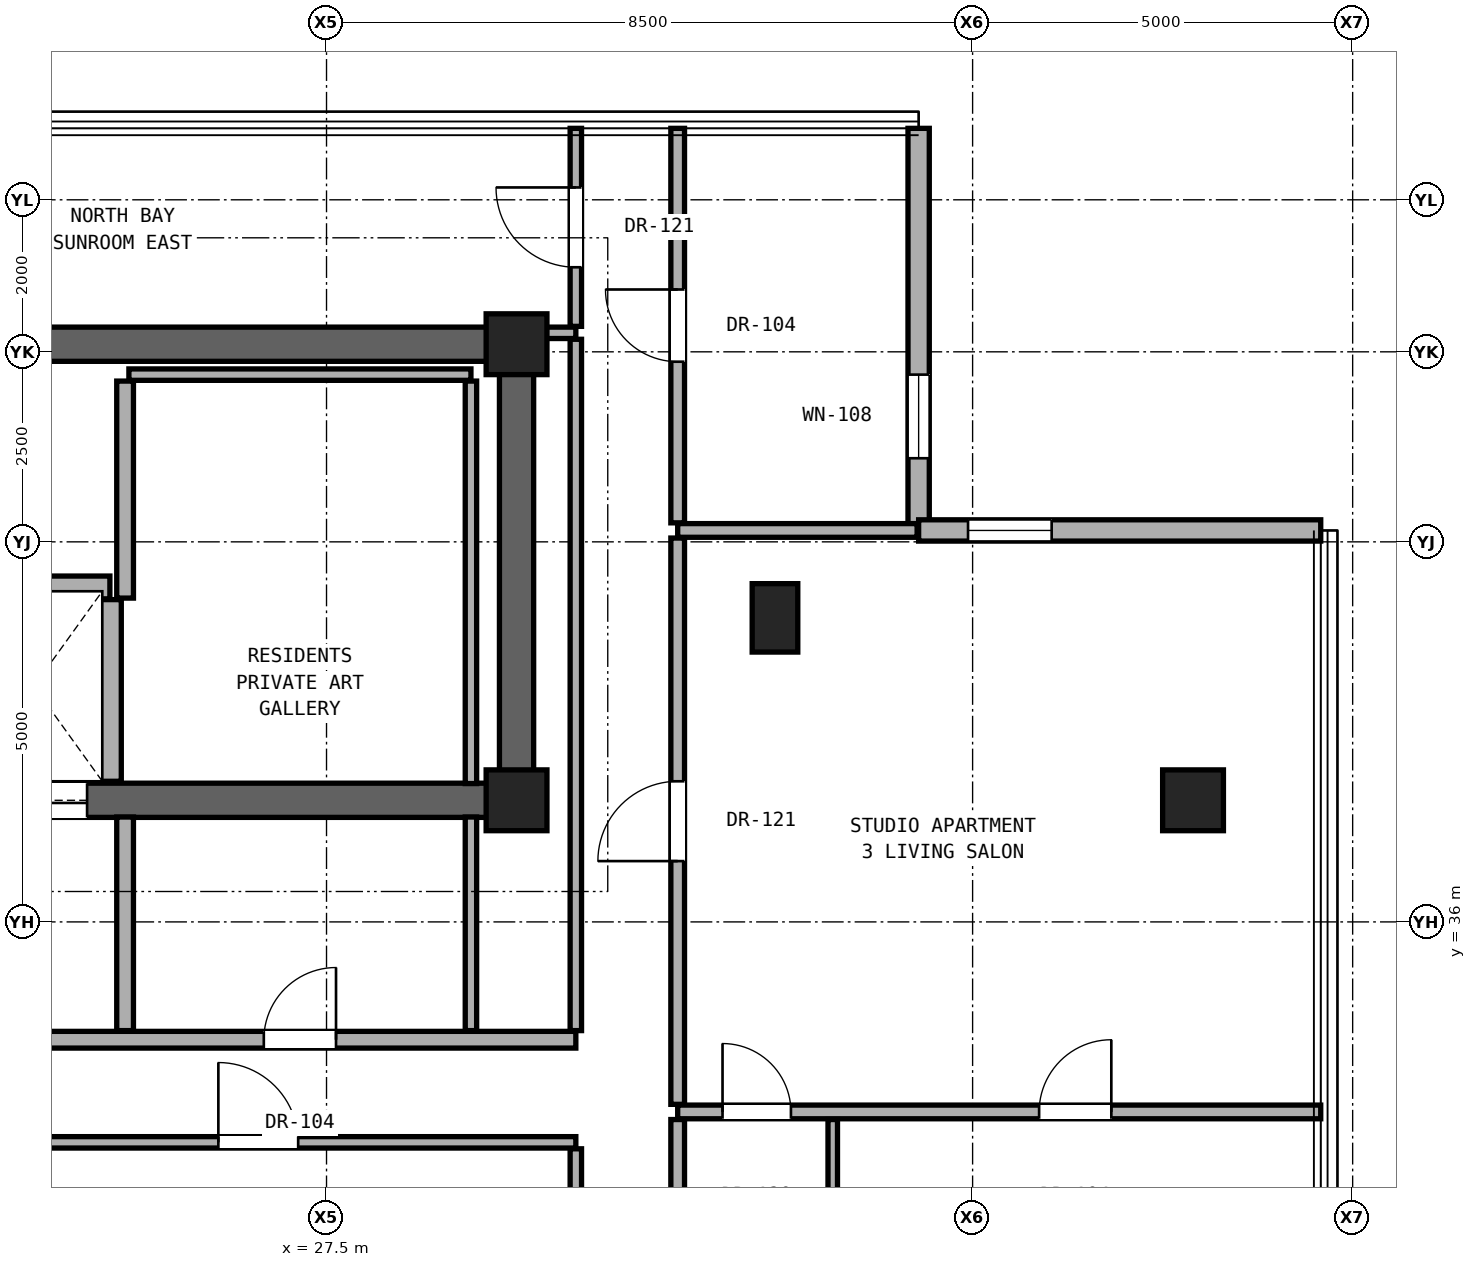
"""IFC4 building model, lengths in metres.
Left out: names, types, materials, properties, quantities, classifications, styles, units other than length and angle.
Written with IfcOpenShell. Run it as: python <this file> out.ifc"""

import sys

from ifc_helpers import new_model, si_unit, direction, frame, frame_2d, origin, origin_2d, place, context, subcontext, project, spatial, rectangle, hollow_rectangle, extrude, element, fill, save


model = new_model("IFC4")
c1 = context("Model", 3, precision=1e-05, world=origin(), true_north=direction((0.0, 1.0)))
c2 = subcontext(c1, "Body", "Model", "MODEL_VIEW")
j1 = project(units=[si_unit("LENGTHUNIT", "METRE"), si_unit("PLANEANGLEUNIT", "RADIAN")], contexts=[c1])
p1 = place(None, origin())
s1 = spatial("IfcSite", under=j1, at=p1, CompositionType="ELEMENT")
p2 = place(p1, origin())
s2 = spatial("IfcBuilding", under=s1, at=p2, CompositionType="ELEMENT")
p3 = place(p2, frame((0.0, 0.0, 219.4)))
s3 = spatial("IfcBuildingStorey", under=s2, at=p3, CompositionType="ELEMENT", Elevation=219.4)
for number, where, z_axis, x_axis in (
    (1, (30.0, 37.6, 0.0), (0.0, 0.0, 1.0), (1.0, 0.0, 0.0)),
    (2, (30.0, 43.6, 0.0), (0.0, 0.0, 1.0), (1.0, 0.0, 0.0)),
):
    element("IfcColumn", number, at=place(p3, frame(where, z_axis=z_axis, x_axis=x_axis)), inside=s3, PredefinedType="COLUMN", context=c2, shape_type="SweptSolid", body=[
        extrude(rectangle(XDim=0.8, YDim=0.8, at=origin_2d()), origin(), (0.0, 0.0, 1.0), 3.3),
    ])
p4 = place(p3, frame((38.9, 37.6, 0.0), z_axis=(0.0, 0.0, 1.0), x_axis=(1.0, 0.0, 0.0)))
e3 = element("IfcColumn", 3, at=p4, inside=s3, PredefinedType="COLUMN", context=c2, shape_type="SweptSolid", body=[
    extrude(hollow_rectangle(XDim=0.8, YDim=0.8, WallThickness=0.045, at=origin_2d()), origin(), (0.0, 0.0, 1.0), 3.3),
])
p5 = place(p3, frame((33.4, 40.0, 0.0), z_axis=(0.0, 0.0, 1.0), x_axis=(1.0, 0.0, 0.0)))
e4 = element("IfcColumn", 4, at=p5, inside=s3, PredefinedType="PILASTER", context=c2, shape_type="SweptSolid", body=[
    extrude(rectangle(XDim=0.6, YDim=0.9, at=origin_2d()), origin(), (0.0, 0.0, 1.0), 3.3),
])
p6 = place(p3, frame((11.0, 43.6, 0.0), z_axis=(0.0, 0.0, 1.0), x_axis=(1.0, 0.0, 0.0)))
e5 = element("IfcWall", 5, at=p6, inside=s3, PredefinedType="SHEAR", context=c2, shape_type="SweptSolid", body=[
    extrude(rectangle(XDim=19.0, YDim=0.45, at=frame_2d((9.5, 0.0))), origin(), (0.0, 0.0, 1.0), 3.1),
])
p7 = place(p3, frame((30.0, 37.6, 0.0), z_axis=(0.0, 0.0, 1.0), x_axis=(0.0, 1.0, 0.0)))
e6 = element("IfcWall", 6, at=p7, inside=s3, PredefinedType="SHEAR", context=c2, shape_type="SweptSolid", body=[
    extrude(rectangle(XDim=6.0, YDim=0.45, at=frame_2d((3.0, 0.0))), origin(), (0.0, 0.0, 1.0), 3.1),
])
p8 = place(p3, frame((11.0, 37.6, 0.0), z_axis=(0.0, 0.0, 1.0), x_axis=(1.0, 0.0, 0.0)))
e7 = element("IfcWall", 7, at=p8, inside=s3, PredefinedType="SHEAR", context=c2, shape_type="SweptSolid", body=[
    extrude(rectangle(XDim=19.0, YDim=0.45, at=frame_2d((9.5, 0.0))), origin(), (0.0, 0.0, 1.0), 3.1),
])
p9 = place(p8, frame((1.06, 0.0, 0.0)))
e8 = element("IfcOpeningElement", 8, at=p9, cuts=e7, PredefinedType="OPENING", context=c2, shape_type="SweptSolid", body=[
    extrude(rectangle(XDim=1.15, YDim=2.2, at=frame_2d((0.575, 1.1))), frame((0.0, 0.235, 0.0), z_axis=(0.0, -1.0, 0.0), x_axis=(1.0, 0.0, 0.0)), (0.0, 0.0, 1.0), 0.47),
])
p10 = place(p8, frame((9.55, 0.0, 0.0)))
e9 = element("IfcOpeningElement", 9, at=p10, cuts=e7, PredefinedType="OPENING", context=c2, shape_type="SweptSolid", body=[
    extrude(rectangle(XDim=1.4, YDim=2.35, at=frame_2d((0.7, 1.175))), frame((0.0, 0.235, 0.0), z_axis=(0.0, -1.0, 0.0), x_axis=(1.0, 0.0, 0.0)), (0.0, 0.0, 1.0), 0.47),
])
p11 = place(p8, frame((11.95, 0.0, 0.0)))
e10 = element("IfcOpeningElement", 10, at=p11, cuts=e7, PredefinedType="OPENING", context=c2, shape_type="SweptSolid", body=[
    extrude(rectangle(XDim=1.4, YDim=2.35, at=frame_2d((0.7, 1.175))), frame((0.0, 0.235, 0.0), z_axis=(0.0, -1.0, 0.0), x_axis=(1.0, 0.0, 0.0)), (0.0, 0.0, 1.0), 0.47),
])
p12 = place(p3, frame((35.29, 41.15, 0.0), z_axis=(0.0, 0.0, 1.0), x_axis=(0.0, 1.0, 0.0)))
e11 = element("IfcWall", 11, at=p12, inside=s3, PredefinedType="SOLIDWALL", context=c2, shape_type="SweptSolid", body=[
    extrude(rectangle(XDim=5.29, YDim=0.28, at=frame_2d((2.645, 0.0))), origin(), (0.0, 0.0, 1.0), 3.08),
])
p13 = place(p12, frame((0.95, 0.0, 0.85)))
e12 = element("IfcOpeningElement", 12, at=p13, cuts=e11, PredefinedType="OPENING", context=c2, shape_type="SweptSolid", body=[
    extrude(rectangle(XDim=1.1, YDim=2.0, at=frame_2d((0.55, 1.0))), frame((0.0, 0.15, 0.0), z_axis=(0.0, -1.0, 0.0), x_axis=(1.0, 0.0, 0.0)), (0.0, 0.0, 1.0), 0.3),
])
p14 = place(p3, frame((40.58, 41.15, 0.0), z_axis=(0.0, 0.0, 1.0), x_axis=(-1.0, 0.0, 0.0)))
e13 = element("IfcWall", 13, at=p14, inside=s3, PredefinedType="SOLIDWALL", context=c2, shape_type="SweptSolid", body=[
    extrude(rectangle(XDim=5.29, YDim=0.28, at=frame_2d((2.645, 0.0))), origin(), (0.0, 0.0, 1.0), 3.08),
])
p15 = place(p14, frame((3.54, 0.0, 0.85)))
e14 = element("IfcOpeningElement", 14, at=p15, cuts=e13, PredefinedType="OPENING", context=c2, shape_type="SweptSolid", body=[
    extrude(rectangle(XDim=1.1, YDim=2.0, at=frame_2d((0.55, 1.0))), frame((0.0, 0.15, 0.0), z_axis=(0.0, -1.0, 0.0), x_axis=(1.0, 0.0, 0.0)), (0.0, 0.0, 1.0), 0.3),
])
p16 = place(p3, frame((10.22, 33.1, 0.0), z_axis=(0.0, 0.0, 1.0), x_axis=(1.0, 0.0, 0.0)))
e15 = element("IfcWall", 15, at=p16, inside=s3, PredefinedType="PARTITIONING", context=c2, shape_type="SweptSolid", body=[
    extrude(rectangle(XDim=20.56, YDim=0.15, at=frame_2d((10.28, 0.0))), origin(), (0.0, 0.0, 1.0), 2.236),
])
p17 = place(p16, frame((15.857, 0.0, 0.0)))
e16 = element("IfcOpeningElement", 16, at=p17, cuts=e15, PredefinedType="OPENING", context=c2, shape_type="SweptSolid", body=[
    extrude(rectangle(XDim=1.05, YDim=2.2, at=frame_2d((0.525, 1.1))), frame((0.0, 0.085, 0.0), z_axis=(0.0, -1.0, 0.0), x_axis=(1.0, 0.0, 0.0)), (0.0, 0.0, 1.0), 0.17),
])
p18 = place(p3, frame((32.12, 33.5, 0.0), z_axis=(0.0, 0.0, 1.0), x_axis=(1.0, 0.0, 0.0)))
e17 = element("IfcWall", 17, at=p18, inside=s3, PredefinedType="PARTITIONING", context=c2, shape_type="SweptSolid", body=[
    extrude(rectangle(XDim=8.46, YDim=0.18, at=frame_2d((4.23, 0.0))), origin(), (0.0, 0.0, 1.0), 2.319),
])
p19 = place(p18, frame((4.755, 0.0, 0.0)))
e18 = element("IfcOpeningElement", 18, at=p19, cuts=e17, PredefinedType="OPENING", context=c2, shape_type="SweptSolid", body=[
    extrude(rectangle(XDim=0.95, YDim=2.15, at=frame_2d((0.475, 1.075))), frame((0.0, 0.1, 0.0), z_axis=(0.0, -1.0, 0.0), x_axis=(1.0, 0.0, 0.0)), (0.0, 0.0, 1.0), 0.2),
])
p20 = place(p18, frame((0.59, 0.0, 0.0)))
e19 = element("IfcOpeningElement", 19, at=p20, cuts=e17, PredefinedType="OPENING", context=c2, shape_type="SweptSolid", body=[
    extrude(rectangle(XDim=0.9, YDim=2.1, at=frame_2d((0.45, 1.05))), frame((0.0, 0.1, 0.0), z_axis=(0.0, -1.0, 0.0), x_axis=(1.0, 0.0, 0.0)), (0.0, 0.0, 1.0), 0.2),
])
p21 = place(p3, frame((15.59, 34.45, 0.0), z_axis=(0.0, 0.0, 1.0), x_axis=(1.0, 0.0, 0.0)))
e20 = element("IfcWall", 20, at=p21, inside=s3, PredefinedType="SOLIDWALL", context=c2, shape_type="SweptSolid", body=[
    extrude(rectangle(XDim=15.19, YDim=0.22, at=frame_2d((7.595, 0.0))), origin(), (0.0, 0.0, 1.0), 2.236),
])
p22 = place(p21, frame((6.435, 0.0, 0.0)))
e21 = element("IfcOpeningElement", 21, at=p22, cuts=e20, PredefinedType="OPENING", context=c2, shape_type="SweptSolid", body=[
    extrude(rectangle(XDim=0.85, YDim=2.01, at=frame_2d((0.425, 1.005))), frame((0.0, 0.12, 0.0), z_axis=(0.0, -1.0, 0.0), x_axis=(1.0, 0.0, 0.0)), (0.0, 0.0, 1.0), 0.24),
])
p23 = place(p21, frame((11.085, 0.0, 0.0)))
e22 = element("IfcOpeningElement", 22, at=p23, cuts=e20, PredefinedType="OPENING", context=c2, shape_type="SweptSolid", body=[
    extrude(rectangle(XDim=0.95, YDim=2.15, at=frame_2d((0.475, 1.075))), frame((0.0, 0.12, 0.0), z_axis=(0.0, -1.0, 0.0), x_axis=(1.0, 0.0, 0.0)), (0.0, 0.0, 1.0), 0.24),
])
p24 = place(p21, frame((1.775, 0.0, 0.0)))
e23 = element("IfcOpeningElement", 23, at=p24, cuts=e20, PredefinedType="OPENING", context=c2, shape_type="SweptSolid", body=[
    extrude(rectangle(XDim=0.85, YDim=2.01, at=frame_2d((0.425, 1.005))), frame((0.0, 0.12, 0.0), z_axis=(0.0, -1.0, 0.0), x_axis=(1.0, 0.0, 0.0)), (0.0, 0.0, 1.0), 0.24),
])
p25 = place(p3, frame((20.25, 40.4, 0.0), z_axis=(0.0, 0.0, 1.0), x_axis=(1.0, 0.0, 0.0)))
e24 = element("IfcWall", 24, at=p25, inside=s3, PredefinedType="SOLIDWALL", context=c2, shape_type="SweptSolid", body=[
    extrude(rectangle(XDim=4.4, YDim=0.3, at=frame_2d((2.2, 0.0))), origin(), (0.0, 0.0, 1.0), 3.1),
])
p26 = place(p3, frame((32.12, 41.15, 0.0), z_axis=(0.0, 0.0, 1.0), x_axis=(1.0, 0.0, 0.0)))
e25 = element("IfcWall", 25, at=p26, inside=s3, PredefinedType="PARTITIONING", context=c2, shape_type="SweptSolid", body=[
    extrude(rectangle(XDim=3.15, YDim=0.18, at=frame_2d((1.575, 0.0))), origin(), (0.0, 0.0, 1.0), 3.1),
])
p27 = place(p3, frame((24.9, 43.2, 0.0), z_axis=(0.0, 0.0, 1.0), x_axis=(1.0, 0.0, 0.0)))
e26 = element("IfcWall", 26, at=p27, inside=s3, PredefinedType="PARTITIONING", context=c2, shape_type="SweptSolid", body=[
    extrude(rectangle(XDim=4.5, YDim=0.15, at=frame_2d((2.25, 0.0))), origin(), (0.0, 0.0, 1.0), 3.1),
])
p28 = place(p3, frame((30.22, 43.75, 0.0), z_axis=(0.0, 0.0, 1.0), x_axis=(1.0, 0.0, 0.0)))
e27 = element("IfcWall", 27, at=p28, inside=s3, PredefinedType="PARTITIONING", context=c2, shape_type="SweptSolid", body=[
    extrude(rectangle(XDim=0.56, YDim=0.15, at=frame_2d((0.28, 0.0))), origin(), (0.0, 0.0, 1.0), 3.1),
])
p29 = place(p3, frame((24.65, 37.85, 0.0), z_axis=(0.0, 0.0, 1.0), x_axis=(0.0, 1.0, 0.0)))
e28 = element("IfcWall", 28, at=p29, inside=s3, PredefinedType="SOLIDWALL", context=c2, shape_type="SweptSolid", body=[
    extrude(rectangle(XDim=2.39, YDim=0.3, at=frame_2d((1.195, 0.0))), origin(), (0.0, 0.0, 1.0), 3.1),
])
p30 = place(p3, frame((24.85, 34.57, 0.0), z_axis=(0.0, 0.0, 1.0), x_axis=(0.0, 1.0, 0.0)))
e29 = element("IfcWall", 29, at=p30, inside=s3, PredefinedType="SOLIDWALL", context=c2, shape_type="SweptSolid", body=[
    extrude(rectangle(XDim=2.81, YDim=0.22, at=frame_2d((1.405, 0.0))), origin(), (0.0, 0.0, 1.0), 3.1),
])
p31 = place(p3, frame((24.85, 40.26, 0.0), z_axis=(0.0, 0.0, 1.0), x_axis=(0.0, 1.0, 0.0)))
e30 = element("IfcWall", 30, at=p31, inside=s3, PredefinedType="SOLIDWALL", context=c2, shape_type="SweptSolid", body=[
    extrude(rectangle(XDim=2.855, YDim=0.22, at=frame_2d((1.427, 0.0))), origin(), (0.0, 0.0, 1.0), 3.1),
])
p32 = place(p3, frame((29.4, 34.57, 0.0), z_axis=(0.0, 0.0, 1.0), x_axis=(0.0, 1.0, 0.0)))
e31 = element("IfcWall", 31, at=p32, inside=s3, PredefinedType="PARTITIONING", context=c2, shape_type="SweptSolid", body=[
    extrude(rectangle(XDim=2.81, YDim=0.15, at=frame_2d((1.405, 0.0))), origin(), (0.0, 0.0, 1.0), 3.1),
])
p33 = place(p3, frame((29.4, 37.82, 0.0), z_axis=(0.0, 0.0, 1.0), x_axis=(0.0, 1.0, 0.0)))
e32 = element("IfcWall", 32, at=p33, inside=s3, PredefinedType="PARTITIONING", context=c2, shape_type="SweptSolid", body=[
    extrude(rectangle(XDim=5.295, YDim=0.15, at=frame_2d((2.647, 0.0))), origin(), (0.0, 0.0, 1.0), 3.1),
])
p34 = place(p3, frame((30.78, 19.985, 0.0), z_axis=(0.0, 0.0, 1.0), x_axis=(0.0, 1.0, 0.0)))
e33 = element("IfcWall", 33, at=p34, inside=s3, PredefinedType="PARTITIONING", context=c2, shape_type="SweptSolid", body=[
    extrude(rectangle(XDim=13.03, YDim=0.15, at=frame_2d((6.515, 0.0))), origin(), (0.0, 0.0, 1.0), 2.396),
])
p35 = place(p3, frame((30.78, 34.57, 0.0), z_axis=(0.0, 0.0, 1.0), x_axis=(0.0, 1.0, 0.0)))
e34 = element("IfcWall", 34, at=p35, inside=s3, PredefinedType="PARTITIONING", context=c2, shape_type="SweptSolid", body=[
    extrude(rectangle(XDim=9.095, YDim=0.15, at=frame_2d((4.547, 0.0))), origin(), (0.0, 0.0, 1.0), 2.492),
])
p36 = place(p3, frame((30.78, 43.835, 0.0), z_axis=(0.0, 0.0, 1.0), x_axis=(0.0, 1.0, 0.0)))
e35 = element("IfcWall", 35, at=p36, inside=s3, PredefinedType="PARTITIONING", context=c2, shape_type="SweptSolid", body=[
    extrude(rectangle(XDim=2.605, YDim=0.15, at=frame_2d((1.302, 0.0))), origin(), (0.0, 0.0, 1.0), 3.1),
])
p37 = place(p36, frame((0.778, 0.0, 0.0)))
e36 = element("IfcOpeningElement", 36, at=p37, cuts=e35, PredefinedType="OPENING", context=c2, shape_type="SweptSolid", body=[
    extrude(rectangle(XDim=1.05, YDim=2.2, at=frame_2d((0.525, 1.1))), frame((0.0, 0.085, 0.0), z_axis=(0.0, -1.0, 0.0), x_axis=(1.0, 0.0, 0.0)), (0.0, 0.0, 1.0), 0.17),
])
p38 = place(p3, frame((32.12, 31.272, 0.0), z_axis=(0.0, 0.0, 1.0), x_axis=(0.0, 1.0, 0.0)))
e37 = element("IfcWall", 37, at=p38, inside=s3, PredefinedType="PARTITIONING", context=c2, shape_type="SweptSolid", body=[
    extrude(rectangle(XDim=2.127, YDim=0.18, at=frame_2d((1.064, 0.0))), origin(), (0.0, 0.0, 1.0), 2.396),
])
p39 = place(p3, frame((32.12, 33.6, 0.0), z_axis=(0.0, 0.0, 1.0), x_axis=(0.0, 1.0, 0.0)))
e38 = element("IfcWall", 38, at=p39, inside=s3, PredefinedType="PARTITIONING", context=c2, shape_type="SweptSolid", body=[
    extrude(rectangle(XDim=7.45, YDim=0.18, at=frame_2d((3.725, 0.0))), origin(), (0.0, 0.0, 1.0), 2.492),
])
p40 = place(p39, frame((3.2, 0.0, 0.0)))
e39 = element("IfcOpeningElement", 39, at=p40, cuts=e38, PredefinedType="OPENING", context=c2, shape_type="SweptSolid", body=[
    extrude(rectangle(XDim=1.05, YDim=2.2, at=frame_2d((0.525, 1.1))), frame((0.0, 0.1, 0.0), z_axis=(0.0, -1.0, 0.0), x_axis=(1.0, 0.0, 0.0)), (0.0, 0.0, 1.0), 0.2),
])
p41 = place(p3, frame((32.12, 41.25, 0.0), z_axis=(0.0, 0.0, 1.0), x_axis=(0.0, 1.0, 0.0)))
e40 = element("IfcWall", 40, at=p41, inside=s3, PredefinedType="PARTITIONING", context=c2, shape_type="SweptSolid", body=[
    extrude(rectangle(XDim=5.19, YDim=0.18, at=frame_2d((2.595, 0.0))), origin(), (0.0, 0.0, 1.0), 3.1),
])
p42 = place(p41, frame((2.12, 0.0, 0.0)))
e41 = element("IfcOpeningElement", 41, at=p42, cuts=e40, PredefinedType="OPENING", context=c2, shape_type="SweptSolid", body=[
    extrude(rectangle(XDim=0.95, YDim=2.15, at=frame_2d((0.475, 1.075))), frame((0.0, 0.1, 0.0), z_axis=(0.0, -1.0, 0.0), x_axis=(1.0, 0.0, 0.0)), (0.0, 0.0, 1.0), 0.2),
])
p43 = place(p3, frame((34.16, 31.272, 0.0), z_axis=(0.0, 0.0, 1.0), x_axis=(0.0, 1.0, 0.0)))
e42 = element("IfcWall", 42, at=p43, inside=s3, PredefinedType="PARTITIONING", context=c2, shape_type="SweptSolid", body=[
    extrude(rectangle(XDim=2.127, YDim=0.125, at=frame_2d((1.064, 0.0))), origin(), (0.0, 0.0, 1.0), 2.396),
])
p44 = place(p13, origin())
e43 = element("IfcWindow", 43, at=p44, inside=s3, PartitioningType="SINGLE_PANEL", PredefinedType="WINDOW", context=c2, shape_type="SweptSolid", body=[
    extrude(rectangle(XDim=1.1, YDim=2.0, at=frame_2d((0.55, 1.0))), frame((0.0, 0.03, 0.0), z_axis=(0.0, -1.0, 0.0), x_axis=(1.0, 0.0, 0.0)), (0.0, 0.0, 1.0), 0.06),
])
fill(e12, e43)
p45 = place(p15, origin())
e44 = element("IfcWindow", 44, at=p45, inside=s3, PartitioningType="SINGLE_PANEL", PredefinedType="WINDOW", context=c2, shape_type="SweptSolid", body=[
    extrude(rectangle(XDim=1.1, YDim=2.0, at=frame_2d((0.55, 1.0))), frame((0.0, 0.03, 0.0), z_axis=(0.0, -1.0, 0.0), x_axis=(1.0, 0.0, 0.0)), (0.0, 0.0, 1.0), 0.06),
])
fill(e14, e44)
p46 = place(p23, origin())
e45 = element("IfcDoor", 45, at=p46, inside=s3, OperationType="SINGLE_SWING_RIGHT", PredefinedType="DOOR", context=c2, shape_type="SweptSolid", body=[
    extrude(rectangle(XDim=0.95, YDim=2.15, at=frame_2d((0.475, 1.075))), frame((0.0, 0.025, 0.0), z_axis=(0.0, -1.0, 0.0), x_axis=(1.0, 0.0, 0.0)), (0.0, 0.0, 1.0), 0.05),
])
fill(e22, e45)
p47 = place(p40, origin())
e46 = element("IfcDoor", 46, at=p47, inside=s3, OperationType="SINGLE_SWING_LEFT", PredefinedType="DOOR", context=c2, shape_type="SweptSolid", body=[
    extrude(rectangle(XDim=1.05, YDim=2.2, at=frame_2d((0.525, 1.1))), frame((0.0, 0.025, 0.0), z_axis=(0.0, -1.0, 0.0), x_axis=(1.0, 0.0, 0.0)), (0.0, 0.0, 1.0), 0.05),
])
fill(e39, e46)
p48 = place(p19, origin())
e47 = element("IfcDoor", 47, at=p48, inside=s3, OperationType="SINGLE_SWING_RIGHT", PredefinedType="DOOR", context=c2, shape_type="SweptSolid", body=[
    extrude(rectangle(XDim=0.95, YDim=2.15, at=frame_2d((0.475, 1.075))), frame((0.0, 0.025, 0.0), z_axis=(0.0, -1.0, 0.0), x_axis=(1.0, 0.0, 0.0)), (0.0, 0.0, 1.0), 0.05),
])
fill(e18, e47)
p49 = place(p20, origin())
e48 = element("IfcDoor", 48, at=p49, inside=s3, OperationType="SINGLE_SWING_LEFT", PredefinedType="DOOR", context=c2, shape_type="SweptSolid", body=[
    extrude(rectangle(XDim=0.9, YDim=2.1, at=frame_2d((0.45, 1.05))), frame((0.0, 0.025, 0.0), z_axis=(0.0, -1.0, 0.0), x_axis=(1.0, 0.0, 0.0)), (0.0, 0.0, 1.0), 0.05),
])
fill(e19, e48)
p50 = place(p17, origin())
e49 = element("IfcDoor", 49, at=p50, inside=s3, OperationType="SINGLE_SWING_LEFT", PredefinedType="DOOR", context=c2, shape_type="SweptSolid", body=[
    extrude(rectangle(XDim=1.05, YDim=2.2, at=frame_2d((0.525, 1.1))), frame((0.0, 0.025, 0.0), z_axis=(0.0, -1.0, 0.0), x_axis=(1.0, 0.0, 0.0)), (0.0, 0.0, 1.0), 0.05),
])
fill(e16, e49)
p51 = place(p37, origin())
e50 = element("IfcDoor", 50, at=p51, inside=s3, OperationType="SINGLE_SWING_RIGHT", PredefinedType="DOOR", context=c2, shape_type="SweptSolid", body=[
    extrude(rectangle(XDim=1.05, YDim=2.2, at=frame_2d((0.525, 1.1))), frame((0.0, 0.025, 0.0), z_axis=(0.0, -1.0, 0.0), x_axis=(1.0, 0.0, 0.0)), (0.0, 0.0, 1.0), 0.05),
])
fill(e36, e50)
p52 = place(p42, origin())
e51 = element("IfcDoor", 51, at=p52, inside=s3, OperationType="SINGLE_SWING_RIGHT", PredefinedType="DOOR", context=c2, shape_type="SweptSolid", body=[
    extrude(rectangle(XDim=0.95, YDim=2.15, at=frame_2d((0.475, 1.075))), frame((0.0, 0.025, 0.0), z_axis=(0.0, -1.0, 0.0), x_axis=(1.0, 0.0, 0.0)), (0.0, 0.0, 1.0), 0.05),
])
fill(e41, e51)
p53 = place(p11, origin())
e52 = element("IfcDoor", 52, at=p53, inside=s3, OperationType="DOUBLE_DOOR_SLIDING", PredefinedType="DOOR", context=c2, shape_type="SweptSolid", body=[
    extrude(rectangle(XDim=1.4, YDim=2.35, at=frame_2d((0.7, 1.175))), frame((0.0, 0.025, 0.0), z_axis=(0.0, -1.0, 0.0), x_axis=(1.0, 0.0, 0.0)), (0.0, 0.0, 1.0), 0.05),
])
fill(e10, e52)
save(model, sys.argv[1])
